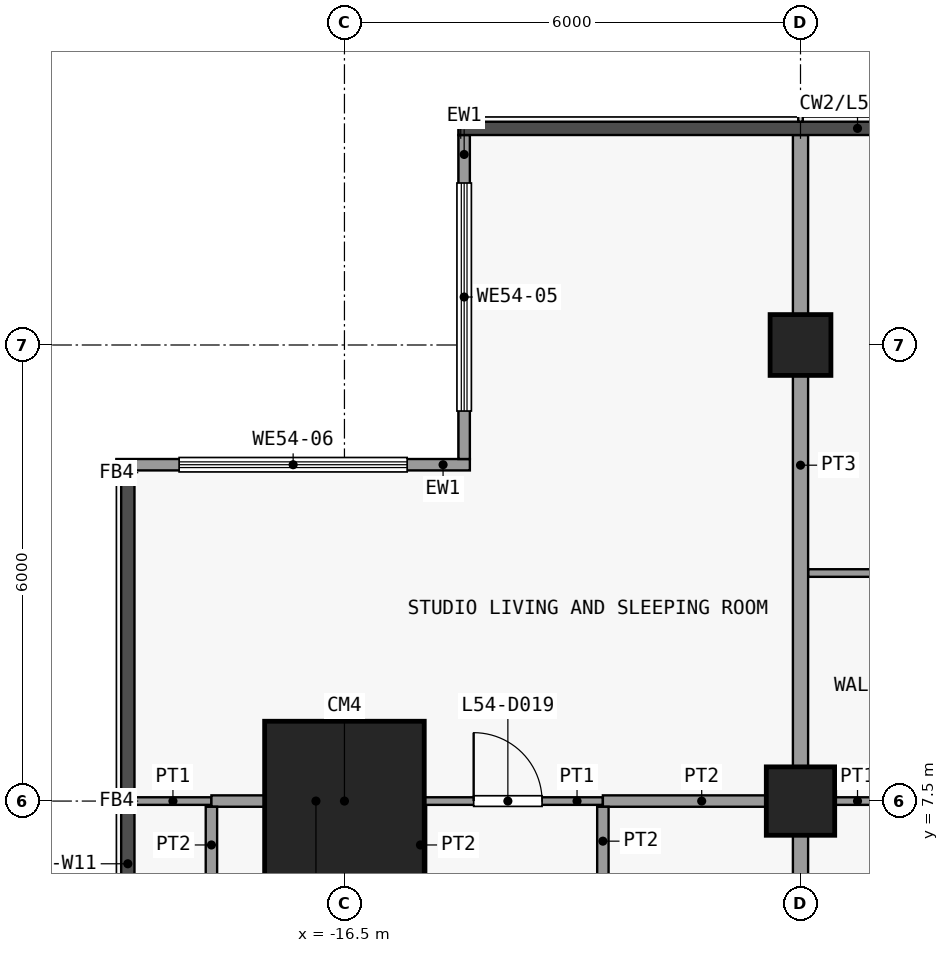
"""IFC4 building model, lengths in metres.
Left out: names, types, materials, properties, quantities, classifications, styles, units other than length and angle.
Written with IfcOpenShell. Run it as: python <this file> out.ifc"""

import sys

from ifc_helpers import new_model, si_unit, direction, frame, frame_2d, origin, origin_2d, place, context, subcontext, project, spatial, rectangle, extrude, element, fill, save


model = new_model("IFC4")
c1 = context("Model", 3, precision=1e-05, world=origin(), true_north=direction((0.0, 1.0)))
c2 = subcontext(c1, "Body", "Model", "MODEL_VIEW")
j1 = project(units=[si_unit("LENGTHUNIT", "METRE"), si_unit("PLANEANGLEUNIT", "RADIAN")], contexts=[c1])
p1 = place(None, origin())
s1 = spatial("IfcSite", under=j1, at=p1, CompositionType="ELEMENT")
p2 = place(p1, origin())
s2 = spatial("IfcBuilding", under=s1, at=p2, CompositionType="ELEMENT")
p3 = place(p2, frame((0.0, 0.0, 215.9)))
s3 = spatial("IfcBuildingStorey", under=s2, at=p3, CompositionType="ELEMENT", Elevation=215.9)
p4 = place(p3, frame((-16.5, 7.5, 0.0), z_axis=(0.0, 0.0, 1.0), x_axis=(1.0, 0.0, 0.0)))
e1 = element("IfcColumn", 1, at=p4, inside=s3, PredefinedType="COLUMN", context=c2, shape_type="SweptSolid", body=[
    extrude(rectangle(XDim=2.1, YDim=2.1, at=origin_2d()), origin(), (0.0, 0.0, 1.0), 3.6),
])
p5 = place(p3, frame((-10.5, 7.5, 0.0), z_axis=(0.0, 0.0, 1.0), x_axis=(1.0, 0.0, 0.0)))
e2 = element("IfcColumn", 2, at=p5, inside=s3, PredefinedType="COLUMN", context=c2, shape_type="SweptSolid", body=[
    extrude(rectangle(XDim=0.9, YDim=0.9, at=origin_2d()), origin(), (0.0, 0.0, 1.0), 3.6),
])
p6 = place(p3, frame((-10.5, 13.5, 0.0), z_axis=(0.0, 0.0, 1.0), x_axis=(1.0, 0.0, 0.0)))
e3 = element("IfcColumn", 3, at=p6, inside=s3, PredefinedType="COLUMN", context=c2, shape_type="SweptSolid", body=[
    extrude(rectangle(XDim=0.8, YDim=0.8, at=origin_2d()), origin(), (0.0, 0.0, 1.0), 3.6),
])
p7 = place(p3, frame((-14.925, 12.0, 0.0), z_axis=(0.0, 0.0, 1.0), x_axis=(0.0, 1.0, 0.0)))
e4 = element("IfcWall", 4, at=p7, inside=s3, PredefinedType="SOLIDWALL", context=c2, shape_type="SweptSolid", body=[
    extrude(rectangle(XDim=4.262, YDim=0.15, at=frame_2d((2.131, 0.0))), origin(), (0.0, 0.0, 1.0), 3.3),
])
p8 = place(p7, frame((0.631, 0.0, 0.9)))
e5 = element("IfcOpeningElement", 5, at=p8, cuts=e4, PredefinedType="OPENING", context=c2, shape_type="SweptSolid", body=[
    extrude(rectangle(XDim=3.0, YDim=2.4, at=frame_2d((1.5, 1.2))), frame((0.0, 0.085, 0.0), z_axis=(0.0, -1.0, 0.0), x_axis=(1.0, 0.0, 0.0)), (0.0, 0.0, 1.0), 0.17),
])
p9 = place(p3, frame((-19.5, 11.925, 0.0), z_axis=(0.0, 0.0, 1.0), x_axis=(1.0, 0.0, 0.0)))
e6 = element("IfcWall", 6, at=p9, inside=s3, PredefinedType="SOLIDWALL", context=c2, shape_type="SweptSolid", body=[
    extrude(rectangle(XDim=4.65, YDim=0.15, at=frame_2d((2.325, 0.0))), origin(), (0.0, 0.0, 1.0), 3.3),
])
p10 = place(p9, frame((0.825, 0.0, 0.9)))
e7 = element("IfcOpeningElement", 7, at=p10, cuts=e6, PredefinedType="OPENING", context=c2, shape_type="SweptSolid", body=[
    extrude(rectangle(XDim=3.0, YDim=2.4, at=frame_2d((1.5, 1.2))), frame((0.0, 0.085, 0.0), z_axis=(0.0, -1.0, 0.0), x_axis=(1.0, 0.0, 0.0)), (0.0, 0.0, 1.0), 0.17),
])
p11 = place(p3, frame((-19.262, 7.5, 0.0), z_axis=(0.0, 0.0, 1.0), x_axis=(1.0, 0.0, 0.0)))
e8 = element("IfcWall", 8, at=p11, inside=s3, PredefinedType="PARTITIONING", context=c2, shape_type="SweptSolid", body=[
    extrude(rectangle(XDim=1.012, YDim=0.1, at=frame_2d((0.506, 0.0))), origin(), (0.0, 0.0, 1.0), 3.3),
])
p12 = place(p3, frame((-15.5, 7.5, 0.0), z_axis=(0.0, 0.0, 1.0), x_axis=(1.0, 0.0, 0.0)))
e9 = element("IfcWall", 9, at=p12, inside=s3, PredefinedType="PARTITIONING", context=c2, shape_type="SweptSolid", body=[
    extrude(rectangle(XDim=2.4, YDim=0.1, at=frame_2d((1.2, 0.0))), origin(), (0.0, 0.0, 1.0), 3.3),
])
p13 = place(p12, frame((0.7, 0.0, 0.0)))
e10 = element("IfcOpeningElement", 10, at=p13, cuts=e9, PredefinedType="OPENING", context=c2, shape_type="SweptSolid", body=[
    extrude(rectangle(XDim=0.9, YDim=2.1, at=frame_2d((0.45, 1.05))), frame((0.0, 0.06, 0.0), z_axis=(0.0, -1.0, 0.0), x_axis=(1.0, 0.0, 0.0)), (0.0, 0.0, 1.0), 0.12),
])
p14 = place(p3, frame((-10.5, 7.5, 0.0), z_axis=(0.0, 0.0, 1.0), x_axis=(1.0, 0.0, 0.0)))
e11 = element("IfcWall", 11, at=p14, inside=s3, PredefinedType="PARTITIONING", context=c2, shape_type="SweptSolid", body=[
    extrude(rectangle(XDim=1.5, YDim=0.1, at=frame_2d((0.75, 0.0))), origin(), (0.0, 0.0, 1.0), 3.3),
])
p15 = place(p3, frame((-18.25, 7.5, 0.0), z_axis=(0.0, 0.0, 1.0), x_axis=(1.0, 0.0, 0.0)))
e12 = element("IfcWall", 12, at=p15, inside=s3, PredefinedType="PARTITIONING", context=c2, shape_type="SweptSolid", body=[
    extrude(rectangle(XDim=2.75, YDim=0.15, at=frame_2d((1.375, 0.0))), origin(), (0.0, 0.0, 1.0), 3.3),
])
p16 = place(p3, frame((-13.1, 7.5, 0.0), z_axis=(0.0, 0.0, 1.0), x_axis=(1.0, 0.0, 0.0)))
e13 = element("IfcWall", 13, at=p16, inside=s3, PredefinedType="PARTITIONING", context=c2, shape_type="SweptSolid", body=[
    extrude(rectangle(XDim=2.6, YDim=0.15, at=frame_2d((1.3, 0.0))), origin(), (0.0, 0.0, 1.0), 3.3),
])
p17 = place(p3, frame((-10.4, 10.5, 0.0), z_axis=(0.0, 0.0, 1.0), x_axis=(1.0, 0.0, 0.0)))
e14 = element("IfcWall", 14, at=p17, inside=s3, PredefinedType="PARTITIONING", context=c2, shape_type="SweptSolid", body=[
    extrude(rectangle(XDim=3.2, YDim=0.1, at=frame_2d((1.6, 0.0))), origin(), (0.0, 0.0, 1.0), 3.3),
])
p18 = place(p17, frame((1.1, 0.0, 0.0)))
e15 = element("IfcOpeningElement", 15, at=p18, cuts=e14, PredefinedType="OPENING", context=c2, shape_type="SweptSolid", body=[
    extrude(rectangle(XDim=0.9, YDim=2.1, at=frame_2d((0.45, 1.05))), frame((0.0, 0.06, 0.0), z_axis=(0.0, -1.0, 0.0), x_axis=(1.0, 0.0, 0.0)), (0.0, 0.0, 1.0), 0.12),
])
p19 = place(p3, frame((-18.25, 4.6, 0.0), z_axis=(0.0, 0.0, 1.0), x_axis=(0.0, 1.0, 0.0)))
e16 = element("IfcWall", 16, at=p19, inside=s3, PredefinedType="PARTITIONING", context=c2, shape_type="SweptSolid", body=[
    extrude(rectangle(XDim=2.825, YDim=0.15, at=frame_2d((1.413, 0.0))), origin(), (0.0, 0.0, 1.0), 3.3),
])
p20 = place(p19, frame((0.8, 0.0, 0.0)))
e17 = element("IfcOpeningElement", 17, at=p20, cuts=e16, PredefinedType="OPENING", context=c2, shape_type="SweptSolid", body=[
    extrude(rectangle(XDim=0.9, YDim=2.1, at=frame_2d((0.45, 1.05))), frame((0.0, 0.085, 0.0), z_axis=(0.0, -1.0, 0.0), x_axis=(1.0, 0.0, 0.0)), (0.0, 0.0, 1.0), 0.17),
])
p21 = place(p3, frame((-15.5, 4.6, 0.0), z_axis=(0.0, 0.0, 1.0), x_axis=(0.0, 1.0, 0.0)))
e18 = element("IfcWall", 18, at=p21, inside=s3, PredefinedType="PARTITIONING", context=c2, shape_type="SweptSolid", body=[
    extrude(rectangle(XDim=2.825, YDim=0.15, at=frame_2d((1.413, 0.0))), origin(), (0.0, 0.0, 1.0), 3.3),
])
p22 = place(p21, frame((0.8, 0.0, 0.0)))
e19 = element("IfcOpeningElement", 19, at=p22, cuts=e18, PredefinedType="OPENING", context=c2, shape_type="SweptSolid", body=[
    extrude(rectangle(XDim=0.9, YDim=2.1, at=frame_2d((0.45, 1.05))), frame((0.0, 0.085, 0.0), z_axis=(0.0, -1.0, 0.0), x_axis=(1.0, 0.0, 0.0)), (0.0, 0.0, 1.0), 0.17),
])
p23 = place(p3, frame((-13.1, 4.6, 0.0), z_axis=(0.0, 0.0, 1.0), x_axis=(0.0, 1.0, 0.0)))
e20 = element("IfcWall", 20, at=p23, inside=s3, PredefinedType="PARTITIONING", context=c2, shape_type="SweptSolid", body=[
    extrude(rectangle(XDim=2.825, YDim=0.15, at=frame_2d((1.413, 0.0))), origin(), (0.0, 0.0, 1.0), 3.3),
])
p24 = place(p23, frame((0.9, 0.0, 0.0)))
e21 = element("IfcOpeningElement", 21, at=p24, cuts=e20, PredefinedType="OPENING", context=c2, shape_type="SweptSolid", body=[
    extrude(rectangle(XDim=0.9, YDim=2.1, at=frame_2d((0.45, 1.05))), frame((0.0, 0.085, 0.0), z_axis=(0.0, -1.0, 0.0), x_axis=(1.0, 0.0, 0.0)), (0.0, 0.0, 1.0), 0.17),
])
p25 = place(p3, frame((-10.5, 4.6, 0.0), z_axis=(0.0, 0.0, 1.0), x_axis=(0.0, 1.0, 0.0)))
e22 = element("IfcWall", 22, at=p25, inside=s3, PredefinedType="PARTITIONING", context=c2, shape_type="SweptSolid", body=[
    extrude(rectangle(XDim=2.825, YDim=0.2, at=frame_2d((1.413, 0.0))), origin(), (0.0, 0.0, 1.0), 3.3),
])
p26 = place(p3, frame((-10.5, 7.575, 0.0), z_axis=(0.0, 0.0, 1.0), x_axis=(0.0, 1.0, 0.0)))
e23 = element("IfcWall", 23, at=p26, inside=s3, PredefinedType="PARTITIONING", context=c2, shape_type="SweptSolid", body=[
    extrude(rectangle(XDim=8.688, YDim=0.2, at=frame_2d((4.344, 0.0))), origin(), (0.0, 0.0, 1.0), 3.3),
])
p27 = place(p8, origin())
e24 = element("IfcWindow", 24, at=p27, inside=s3, PartitioningType="SINGLE_PANEL", PredefinedType="WINDOW", context=c2, shape_type="SweptSolid", body=[
    extrude(rectangle(XDim=3.0, YDim=2.4, at=frame_2d((1.5, 1.2))), frame((0.0, 0.03, 0.0), z_axis=(0.0, -1.0, 0.0), x_axis=(1.0, 0.0, 0.0)), (0.0, 0.0, 1.0), 0.06),
])
fill(e5, e24)
p28 = place(p10, origin())
e25 = element("IfcWindow", 25, at=p28, inside=s3, PartitioningType="SINGLE_PANEL", PredefinedType="WINDOW", context=c2, shape_type="SweptSolid", body=[
    extrude(rectangle(XDim=3.0, YDim=2.4, at=frame_2d((1.5, 1.2))), frame((0.0, 0.03, 0.0), z_axis=(0.0, -1.0, 0.0), x_axis=(1.0, 0.0, 0.0)), (0.0, 0.0, 1.0), 0.06),
])
fill(e7, e25)
p29 = place(p13, origin())
e26 = element("IfcDoor", 26, at=p29, inside=s3, OperationType="SINGLE_SWING_RIGHT", PredefinedType="DOOR", context=c2, shape_type="SweptSolid", body=[
    extrude(rectangle(XDim=0.9, YDim=2.1, at=frame_2d((0.45, 1.05))), frame((0.0, 0.025, 0.0), z_axis=(0.0, -1.0, 0.0), x_axis=(1.0, 0.0, 0.0)), (0.0, 0.0, 1.0), 0.05),
])
fill(e10, e26)
save(model, sys.argv[1])
